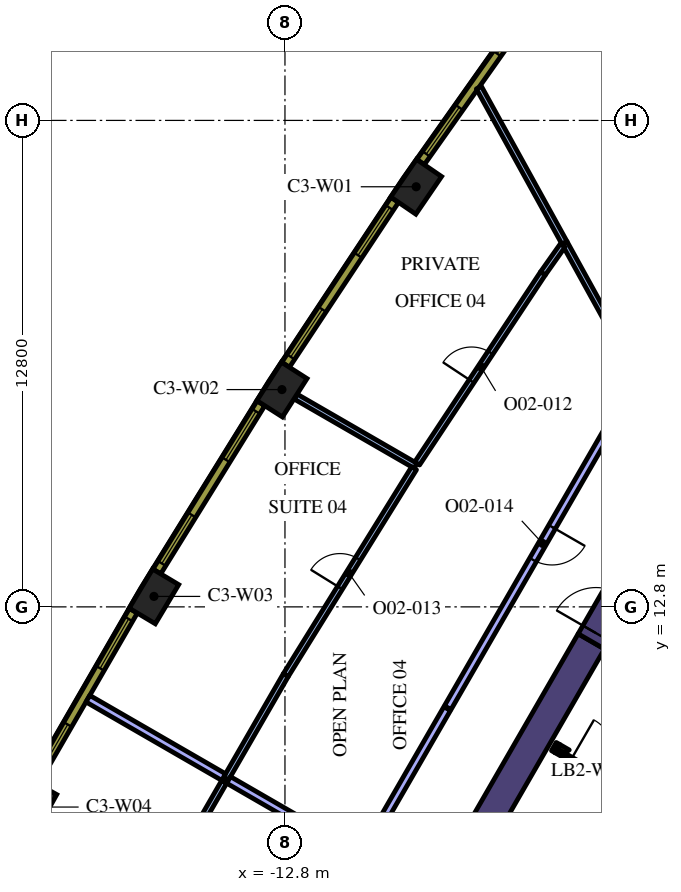
"""IFC4 building model, lengths in metres.
Left out: names, types, materials, properties, quantities, classifications, styles, units other than length and angle.
Written with IfcOpenShell. Run it as: python <this file> out.ifc"""

import sys

from ifc_helpers import new_model, si_unit, direction, frame, frame_2d, origin, origin_2d, place, context, subcontext, project, spatial, polyline, rectangle, outline, extrude, element, fill, save


model = new_model("IFC4")
c1 = context("Model", 3, precision=1e-05, world=origin(), true_north=direction((0.0, 1.0)))
c2 = subcontext(c1, "Body", "Model", "MODEL_VIEW")
j1 = project(units=[si_unit("LENGTHUNIT", "METRE"), si_unit("PLANEANGLEUNIT", "RADIAN")], contexts=[c1])
p1 = place(None, origin())
s1 = spatial("IfcSite", under=j1, at=p1, CompositionType="ELEMENT")
p2 = place(p1, origin())
s2 = spatial("IfcBuilding", under=s1, at=p2, CompositionType="ELEMENT")
p3 = place(p2, frame((0.0, 0.0, 158.4)))
s3 = spatial("IfcBuildingStorey", under=s2, at=p3, CompositionType="ELEMENT", Elevation=158.4)
for number, where, z_axis, x_axis in (
    (1, (-9.348, 23.854, 0.0), (0.0, 0.0, 1.0), (-0.565, -0.825, 0.0)),
    (2, (-12.88, 18.517, 0.0), (0.0, 0.0, 1.0), (-0.539, -0.842, 0.0)),
    (3, (-16.247, 13.075, 0.0), (0.0, 0.0, 1.0), (-0.513, -0.858, 0.0)),
    (4, (-19.447, 7.533, 0.0), (0.0, 0.0, 1.0), (-0.487, -0.874, 0.0)),
):
    element("IfcColumn", number, at=place(p3, frame(where, z_axis=z_axis, x_axis=x_axis)), inside=s3, PredefinedType="COLUMN", context=c2, shape_type="SweptSolid", body=[
        extrude(rectangle(XDim=1.2, YDim=0.8, at=origin_2d()), origin(), (0.0, 0.0, 1.0), 4.2),
    ])
p4 = place(p3, frame((-12.668, -1.842, 0.0), z_axis=(0.0, 0.0, 1.0), x_axis=(0.500003640647, 0.866023301845, 0.0)))
e5 = element("IfcWall", 5, at=p4, inside=s3, PredefinedType="SOLIDWALL", context=c2, shape_type="SweptSolid", body=[
    extrude(rectangle(XDim=15.858, YDim=0.8, at=frame_2d((7.929, 0.0))), origin(), (0.0, 0.0, 1.0), 4.2),
])
p5 = place(p3, frame((-8.06, -1.311, 0.0), z_axis=(0.0, 0.0, 1.0), x_axis=(0.50000273126, 0.866023826885, 0.0)))
e6 = element("IfcWall", 6, at=p5, inside=s3, PredefinedType="SOLIDWALL", context=c2, shape_type="SweptSolid", body=[
    extrude(rectangle(XDim=10.33, YDim=0.25, at=frame_2d((5.165, 0.0))), origin(), (0.0, 0.0, 1.0), 4.2),
])
p6 = place(p3, frame((-5.725, 9.125, 0.0), z_axis=(0.0, 0.0, 1.0), x_axis=(0.866185586049, -0.49972245349, 0.0)))
e7 = element("IfcWall", 7, at=p6, inside=s3, PredefinedType="SOLIDWALL", context=c2, shape_type="SweptSolid", body=[
    extrude(rectangle(XDim=0.11, YDim=0.25, at=frame_2d((0.055, 0.0))), origin(), (0.0, 0.0, 1.0), 4.2),
])
p7 = place(p3, origin())
e8 = element("IfcWall", 8, at=p7, inside=s3, PredefinedType="SOLIDWALL", context=c2, shape_type="SweptSolid", body=[
    extrude(outline(polyline([(-5.689, 8.96), (-5.69, 8.961), (-5.565, 9.177), (-5.319, 9.035), (-5.335, 9.026), (-5.351, 9.015), (-5.366, 9.002), (-5.379, 8.988), (-5.392, 8.972), (-5.402, 8.956), (-5.412, 8.939), (-5.629, 9.064), (-5.629, 9.064), (-5.689, 8.96)])), origin(), (0.0, 0.0, 1.0), 4.2),
])
p8 = place(p3, frame((-5.659, 9.012, 0.0), z_axis=(0.0, 0.0, 1.0), x_axis=(0.866009402589, -0.500027713859, 0.0)))
e9 = element("IfcWall", 9, at=p8, inside=s3, PredefinedType="PARTITIONING", context=c2, shape_type="SweptSolid", body=[
    extrude(rectangle(XDim=2.1, YDim=0.12, at=frame_2d((1.05, 0.0))), origin(), (0.0, 0.0, 1.0), 3.15),
])
p9 = place(p8, frame((0.45, 0.0, 0.0)))
e10 = element("IfcOpeningElement", 10, at=p9, cuts=e9, PredefinedType="OPENING", context=c2, shape_type="SweptSolid", body=[
    extrude(rectangle(XDim=1.2, YDim=2.1, at=frame_2d((0.6, 1.05))), frame((0.0, 0.07, 0.0), z_axis=(0.0, -1.0, 0.0), x_axis=(1.0, 0.0, 0.0)), (0.0, 0.0, 1.0), 0.14),
])
p10 = place(p3, frame((-4.739, 11.892, 0.0), z_axis=(0.0, 0.0, 1.0), x_axis=(0.500062241894, 0.865989465428, 0.0)))
e11 = element("IfcWall", 11, at=p10, inside=s3, PredefinedType="SOLIDWALL", context=c2, shape_type="SweptSolid", body=[
    extrude(rectangle(XDim=1.7, YDim=0.8, at=frame_2d((0.85, 0.0))), origin(), (0.0, 0.0, 1.0), 4.2),
])
p11 = place(p10, frame((0.25, 0.0, 0.0)))
e12 = element("IfcOpeningElement", 12, at=p11, cuts=e11, PredefinedType="OPENING", context=c2, shape_type="SweptSolid", body=[
    extrude(rectangle(XDim=1.2, YDim=2.1, at=frame_2d((0.6, 1.05))), frame((0.0, 0.41, 0.0), z_axis=(0.0, -1.0, 0.0), x_axis=(1.0, 0.0, 0.0)), (0.0, 0.0, 1.0), 0.82),
])
p12 = place(p3, frame((-5.442, 22.374, 0.0), z_axis=(0.0, 0.0, 1.0), x_axis=(-0.482987550425, 0.875627218703, 0.0)))
e13 = element("IfcWall", 13, at=p12, inside=s3, PredefinedType="PARTITIONING", context=c2, shape_type="SweptSolid", body=[
    extrude(rectangle(XDim=4.672, YDim=0.15, at=frame_2d((2.336, 0.0))), origin(), (0.0, 0.0, 1.0), 3.15),
])
p13 = place(p3, frame((-3.47, 18.8, 0.0), z_axis=(0.0, 0.0, 1.0), x_axis=(-0.482974768035, 0.875634269225, 0.0)))
e14 = element("IfcWall", 14, at=p13, inside=s3, PredefinedType="PARTITIONING", context=c2, shape_type="SweptSolid", body=[
    extrude(rectangle(XDim=4.09, YDim=0.15, at=frame_2d((2.045, 0.0))), origin(), (0.0, 0.0, 1.0), 3.15),
])
p14 = place(p3, frame((-9.363, 16.511, 0.0), z_axis=(0.0, 0.0, 1.0), x_axis=(-0.866006134298, 0.500033374244, 0.0)))
e15 = element("IfcWall", 15, at=p14, inside=s3, PredefinedType="PARTITIONING", context=c2, shape_type="SweptSolid", body=[
    extrude(rectangle(XDim=3.648, YDim=0.15, at=frame_2d((1.824, 0.0))), origin(), (0.0, 0.0, 1.0), 3.15),
])
p15 = place(p3, frame((-5.492, 22.31, 0.0), z_axis=(0.0, 0.0, 1.0), x_axis=(-0.576980663571, -0.816757806124, 0.0)))
e16 = element("IfcWall", 16, at=p15, inside=s3, PredefinedType="PARTITIONING", context=c2, shape_type="SweptSolid", body=[
    extrude(rectangle(XDim=0.902, YDim=0.15, at=frame_2d((0.451, 0.0))), origin(), (0.0, 0.0, 1.0), 3.15),
])
p16 = place(p3, frame((-9.322, 16.573, 0.0), z_axis=(0.0, 0.0, 1.0), x_axis=(0.551906048292, 0.833906298009, 0.0)))
e17 = element("IfcWall", 17, at=p16, inside=s3, PredefinedType="PARTITIONING", context=c2, shape_type="SweptSolid", body=[
    extrude(rectangle(XDim=5.995, YDim=0.15, at=frame_2d((2.998, 0.0))), origin(), (0.0, 0.0, 1.0), 3.15),
])
p17 = place(p16, frame((2.595, 0.0, 0.0)))
e18 = element("IfcOpeningElement", 18, at=p17, cuts=e17, PredefinedType="OPENING", context=c2, shape_type="SweptSolid", body=[
    extrude(rectangle(XDim=0.9, YDim=2.1, at=frame_2d((0.45, 1.05))), frame((0.0, 0.085, 0.0), z_axis=(0.0, -1.0, 0.0), x_axis=(1.0, 0.0, 0.0)), (0.0, 0.0, 1.0), 0.17),
])
p18 = place(p3, frame((-12.779, 11.002, 0.0), z_axis=(0.0, 0.0, 1.0), x_axis=(0.527026092571, 0.849849102929, 0.0)))
e19 = element("IfcWall", 19, at=p18, inside=s3, PredefinedType="PARTITIONING", context=c2, shape_type="SweptSolid", body=[
    extrude(rectangle(XDim=6.407, YDim=0.15, at=frame_2d((3.204, 0.0))), origin(), (0.0, 0.0, 1.0), 3.15),
])
p19 = place(p18, frame((2.707, 0.0, 0.0)))
e20 = element("IfcOpeningElement", 20, at=p19, cuts=e19, PredefinedType="OPENING", context=c2, shape_type="SweptSolid", body=[
    extrude(rectangle(XDim=0.9, YDim=2.1, at=frame_2d((0.45, 1.05))), frame((0.0, 0.085, 0.0), z_axis=(0.0, -1.0, 0.0), x_axis=(1.0, 0.0, 0.0)), (0.0, 0.0, 1.0), 0.17),
])
p20 = place(p3, frame((-12.779, 11.002, 0.0), z_axis=(0.0, 0.0, 1.0), x_axis=(-0.499996312652, -0.866027532665, 0.0)))
e21 = element("IfcWall", 21, at=p20, inside=s3, PredefinedType="PARTITIONING", context=c2, shape_type="SweptSolid", body=[
    extrude(rectangle(XDim=3.138, YDim=0.15, at=frame_2d((1.569, 0.0))), origin(), (0.0, 0.0, 1.0), 3.15),
])
p21 = place(p3, frame((-14.413, 8.322, 0.0), z_axis=(0.0, 0.0, 1.0), x_axis=(-0.866034795751, 0.499983732284, 0.0)))
e22 = element("IfcWall", 22, at=p21, inside=s3, PredefinedType="PARTITIONING", context=c2, shape_type="SweptSolid", body=[
    extrude(rectangle(XDim=4.125, YDim=0.2, at=frame_2d((2.062, 0.0))), origin(), (0.0, 0.0, 1.0), 3.15),
])
p22 = place(p3, frame((-10.782, 6.225, 0.0), z_axis=(0.0, 0.0, 1.0), x_axis=(-0.866034752867, 0.499983806564, 0.0)))
e23 = element("IfcWall", 23, at=p22, inside=s3, PredefinedType="PARTITIONING", context=c2, shape_type="SweptSolid", body=[
    extrude(rectangle(XDim=4.043, YDim=0.2, at=frame_2d((2.021, 0.0))), origin(), (0.0, 0.0, 1.0), 3.15),
])
p23 = place(p3, frame((-8.532, 10.122, 0.0), z_axis=(0.0, 0.0, 1.0), x_axis=(-0.499988222896, -0.866032203192, 0.0)))
e24 = element("IfcWall", 24, at=p23, inside=s3, PredefinedType="PARTITIONING", context=c2, shape_type="SweptSolid", body=[
    extrude(rectangle(XDim=4.4, YDim=0.2, at=frame_2d((2.2, 0.0))), origin(), (0.0, 0.0, 1.0), 3.15),
])
p24 = place(p3, frame((-3.522, 18.8, 0.0), z_axis=(0.0, 0.0, 1.0), x_axis=(-0.500015783377, -0.866016291056, 0.0)))
e25 = element("IfcWall", 25, at=p24, inside=s3, PredefinedType="PARTITIONING", context=c2, shape_type="SweptSolid", body=[
    extrude(rectangle(XDim=9.99, YDim=0.2, at=frame_2d((4.995, 0.0))), origin(), (0.0, 0.0, 1.0), 3.15),
])
p25 = place(p24, frame((4.5, 0.0, 0.0)))
e26 = element("IfcOpeningElement", 26, at=p25, cuts=e25, PredefinedType="OPENING", context=c2, shape_type="SweptSolid", body=[
    extrude(rectangle(XDim=1.0, YDim=2.1, at=frame_2d((0.5, 1.05))), frame((0.0, 0.11, 0.0), z_axis=(0.0, -1.0, 0.0), x_axis=(1.0, 0.0, 0.0)), (0.0, 0.0, 1.0), 0.22),
])
p26 = place(p3, frame((-14.398, 8.198, 0.0), z_axis=(0.0, 0.0, 1.0), x_axis=(-0.499993740961, -0.866029017412, 0.0)))
e27 = element("IfcWall", 27, at=p26, inside=s3, PredefinedType="PARTITIONING", context=c2, shape_type="SweptSolid", body=[
    extrude(rectangle(XDim=3.038, YDim=0.15, at=frame_2d((1.519, 0.0))), origin(), (0.0, 0.0, 1.0), 3.15),
])
p27 = place(p3, frame((-6.223, 28.762, 0.0), z_axis=(0.0, 0.0, 1.0), x_axis=(-0.577115207679, -0.816662743772, 0.0)))
e28 = element("IfcWall", 28, at=p27, inside=s3, PredefinedType="SOLIDWALL", context=c2, shape_type="SweptSolid", body=[
    extrude(rectangle(XDim=5.213, YDim=0.24, at=frame_2d((2.606, 0.0))), origin(), (0.0, 0.0, 1.0), 3.95),
])
p28 = place(p27, frame((0.221, 0.0, 0.9)))
e29 = element("IfcOpeningElement", 29, at=p28, cuts=e28, PredefinedType="OPENING", context=c2, shape_type="SweptSolid", body=[
    extrude(rectangle(XDim=1.5, YDim=2.55, at=frame_2d((0.75, 1.275))), frame((0.0, 0.13, 0.0), z_axis=(0.0, -1.0, 0.0), x_axis=(1.0, 0.0, 0.0)), (0.0, 0.0, 1.0), 0.26),
])
p29 = place(p27, frame((3.452, 0.0, 0.9)))
e30 = element("IfcOpeningElement", 30, at=p29, cuts=e28, PredefinedType="OPENING", context=c2, shape_type="SweptSolid", body=[
    extrude(rectangle(XDim=1.5, YDim=2.55, at=frame_2d((0.75, 1.275))), frame((0.0, 0.13, 0.0), z_axis=(0.0, -1.0, 0.0), x_axis=(1.0, 0.0, 0.0)), (0.0, 0.0, 1.0), 0.26),
])
p30 = place(p3, frame((-9.911, 23.51, 0.0), z_axis=(0.0, 0.0, 1.0), x_axis=(-0.551892811511, -0.833915058386, 0.0)))
e31 = element("IfcWall", 31, at=p30, inside=s3, PredefinedType="SOLIDWALL", context=c2, shape_type="SweptSolid", body=[
    extrude(rectangle(XDim=5.204, YDim=0.24, at=frame_2d((2.602, 0.0))), origin(), (0.0, 0.0, 1.0), 3.95),
])
p31 = place(p30, frame((0.248, 0.0, 0.9)))
e32 = element("IfcOpeningElement", 32, at=p31, cuts=e31, PredefinedType="OPENING", context=c2, shape_type="SweptSolid", body=[
    extrude(rectangle(XDim=1.5, YDim=2.55, at=frame_2d((0.75, 1.275))), frame((0.0, 0.13, 0.0), z_axis=(0.0, -1.0, 0.0), x_axis=(1.0, 0.0, 0.0)), (0.0, 0.0, 1.0), 0.26),
])
p32 = place(p30, frame((3.455, 0.0, 0.9)))
e33 = element("IfcOpeningElement", 33, at=p32, cuts=e31, PredefinedType="OPENING", context=c2, shape_type="SweptSolid", body=[
    extrude(rectangle(XDim=1.5, YDim=2.55, at=frame_2d((0.75, 1.275))), frame((0.0, 0.13, 0.0), z_axis=(0.0, -1.0, 0.0), x_axis=(1.0, 0.0, 0.0)), (0.0, 0.0, 1.0), 0.26),
])
p33 = place(p3, frame((-13.433, 18.156, 0.0), z_axis=(0.0, 0.0, 1.0), x_axis=(-0.526197926587, -0.850362124072, 0.0)))
e34 = element("IfcWall", 34, at=p33, inside=s3, PredefinedType="SOLIDWALL", context=c2, shape_type="SweptSolid", body=[
    extrude(rectangle(XDim=5.203, YDim=0.24, at=frame_2d((2.602, 0.0))), origin(), (0.0, 0.0, 1.0), 3.95),
])
p34 = place(p33, frame((0.248, 0.0, 0.9)))
e35 = element("IfcOpeningElement", 35, at=p34, cuts=e34, PredefinedType="OPENING", context=c2, shape_type="SweptSolid", body=[
    extrude(rectangle(XDim=1.5, YDim=2.55, at=frame_2d((0.75, 1.275))), frame((0.0, 0.13, 0.0), z_axis=(0.0, -1.0, 0.0), x_axis=(1.0, 0.0, 0.0)), (0.0, 0.0, 1.0), 0.26),
])
p35 = place(p33, frame((3.455, 0.0, 0.9)))
e36 = element("IfcOpeningElement", 36, at=p35, cuts=e34, PredefinedType="OPENING", context=c2, shape_type="SweptSolid", body=[
    extrude(rectangle(XDim=1.5, YDim=2.55, at=frame_2d((0.75, 1.275))), frame((0.0, 0.13, 0.0), z_axis=(0.0, -1.0, 0.0), x_axis=(1.0, 0.0, 0.0)), (0.0, 0.0, 1.0), 0.26),
])
p36 = place(p3, frame((-16.789, 12.697, 0.0), z_axis=(0.0, 0.0, 1.0), x_axis=(-0.500009456303, -0.866019944116, 0.0)))
e37 = element("IfcWall", 37, at=p36, inside=s3, PredefinedType="SOLIDWALL", context=c2, shape_type="SweptSolid", body=[
    extrude(rectangle(XDim=5.204, YDim=0.24, at=frame_2d((2.602, 0.0))), origin(), (0.0, 0.0, 1.0), 3.95),
])
p37 = place(p36, frame((0.248, 0.0, 0.9)))
e38 = element("IfcOpeningElement", 38, at=p37, cuts=e37, PredefinedType="OPENING", context=c2, shape_type="SweptSolid", body=[
    extrude(rectangle(XDim=1.5, YDim=2.55, at=frame_2d((0.75, 1.275))), frame((0.0, 0.13, 0.0), z_axis=(0.0, -1.0, 0.0), x_axis=(1.0, 0.0, 0.0)), (0.0, 0.0, 1.0), 0.26),
])
p38 = place(p36, frame((3.455, 0.0, 0.9)))
e39 = element("IfcOpeningElement", 39, at=p38, cuts=e37, PredefinedType="OPENING", context=c2, shape_type="SweptSolid", body=[
    extrude(rectangle(XDim=1.5, YDim=2.55, at=frame_2d((0.75, 1.275))), frame((0.0, 0.13, 0.0), z_axis=(0.0, -1.0, 0.0), x_axis=(1.0, 0.0, 0.0)), (0.0, 0.0, 1.0), 0.26),
])
p39 = place(p9, origin())
e40 = element("IfcDoor", 40, at=p39, inside=s3, OperationType="SINGLE_SWING_LEFT", PredefinedType="DOOR", context=c2, shape_type="SweptSolid", body=[
    extrude(rectangle(XDim=1.2, YDim=2.1, at=frame_2d((0.6, 1.05))), frame((0.0, 0.025, 0.0), z_axis=(0.0, -1.0, 0.0), x_axis=(1.0, 0.0, 0.0)), (0.0, 0.0, 1.0), 0.05),
])
fill(e10, e40)
p40 = place(p11, origin())
e41 = element("IfcDoor", 41, at=p40, inside=s3, OperationType="SINGLE_SWING_LEFT", PredefinedType="DOOR", context=c2, shape_type="SweptSolid", body=[
    extrude(rectangle(XDim=1.2, YDim=2.1, at=frame_2d((0.6, 1.05))), frame((0.0, 0.025, 0.0), z_axis=(0.0, -1.0, 0.0), x_axis=(1.0, 0.0, 0.0)), (0.0, 0.0, 1.0), 0.05),
])
fill(e12, e41)
p41 = place(p17, origin())
e42 = element("IfcDoor", 42, at=p41, inside=s3, OperationType="SINGLE_SWING_RIGHT", PredefinedType="DOOR", context=c2, shape_type="SweptSolid", body=[
    extrude(rectangle(XDim=0.9, YDim=2.1, at=frame_2d((0.45, 1.05))), frame((0.0, 0.025, 0.0), z_axis=(0.0, -1.0, 0.0), x_axis=(1.0, 0.0, 0.0)), (0.0, 0.0, 1.0), 0.05),
])
fill(e18, e42)
p42 = place(p19, origin())
e43 = element("IfcDoor", 43, at=p42, inside=s3, OperationType="SINGLE_SWING_LEFT", PredefinedType="DOOR", context=c2, shape_type="SweptSolid", body=[
    extrude(rectangle(XDim=0.9, YDim=2.1, at=frame_2d((0.45, 1.05))), frame((0.0, 0.025, 0.0), z_axis=(0.0, -1.0, 0.0), x_axis=(1.0, 0.0, 0.0)), (0.0, 0.0, 1.0), 0.05),
])
fill(e20, e43)
p43 = place(p25, origin())
e44 = element("IfcDoor", 44, at=p43, inside=s3, OperationType="SINGLE_SWING_RIGHT", PredefinedType="DOOR", context=c2, shape_type="SweptSolid", body=[
    extrude(rectangle(XDim=1.0, YDim=2.1, at=frame_2d((0.5, 1.05))), frame((0.0, 0.025, 0.0), z_axis=(0.0, -1.0, 0.0), x_axis=(1.0, 0.0, 0.0)), (0.0, 0.0, 1.0), 0.05),
])
fill(e26, e44)
p44 = place(p28, origin())
e45 = element("IfcWindow", 45, at=p44, inside=s3, PartitioningType="SINGLE_PANEL", PredefinedType="WINDOW", context=c2, shape_type="SweptSolid", body=[
    extrude(rectangle(XDim=1.5, YDim=2.55, at=frame_2d((0.75, 1.275))), frame((0.0, 0.04, 0.0), z_axis=(0.0, -1.0, 0.0), x_axis=(1.0, 0.0, 0.0)), (0.0, 0.0, 1.0), 0.06),
])
fill(e29, e45)
p45 = place(p29, origin())
e46 = element("IfcWindow", 46, at=p45, inside=s3, PartitioningType="SINGLE_PANEL", PredefinedType="WINDOW", context=c2, shape_type="SweptSolid", body=[
    extrude(rectangle(XDim=1.5, YDim=2.55, at=frame_2d((0.75, 1.275))), frame((0.0, 0.04, 0.0), z_axis=(0.0, -1.0, 0.0), x_axis=(1.0, 0.0, 0.0)), (0.0, 0.0, 1.0), 0.06),
])
fill(e30, e46)
p46 = place(p31, origin())
e47 = element("IfcWindow", 47, at=p46, inside=s3, PartitioningType="SINGLE_PANEL", PredefinedType="WINDOW", context=c2, shape_type="SweptSolid", body=[
    extrude(rectangle(XDim=1.5, YDim=2.55, at=frame_2d((0.75, 1.275))), frame((0.0, 0.04, 0.0), z_axis=(0.0, -1.0, 0.0), x_axis=(1.0, 0.0, 0.0)), (0.0, 0.0, 1.0), 0.06),
])
fill(e32, e47)
p47 = place(p32, origin())
e48 = element("IfcWindow", 48, at=p47, inside=s3, PartitioningType="SINGLE_PANEL", PredefinedType="WINDOW", context=c2, shape_type="SweptSolid", body=[
    extrude(rectangle(XDim=1.5, YDim=2.55, at=frame_2d((0.75, 1.275))), frame((0.0, 0.04, 0.0), z_axis=(0.0, -1.0, 0.0), x_axis=(1.0, 0.0, 0.0)), (0.0, 0.0, 1.0), 0.06),
])
fill(e33, e48)
p48 = place(p34, origin())
e49 = element("IfcWindow", 49, at=p48, inside=s3, PartitioningType="SINGLE_PANEL", PredefinedType="WINDOW", context=c2, shape_type="SweptSolid", body=[
    extrude(rectangle(XDim=1.5, YDim=2.55, at=frame_2d((0.75, 1.275))), frame((0.0, 0.04, 0.0), z_axis=(0.0, -1.0, 0.0), x_axis=(1.0, 0.0, 0.0)), (0.0, 0.0, 1.0), 0.06),
])
fill(e35, e49)
p49 = place(p35, origin())
e50 = element("IfcWindow", 50, at=p49, inside=s3, PartitioningType="SINGLE_PANEL", PredefinedType="WINDOW", context=c2, shape_type="SweptSolid", body=[
    extrude(rectangle(XDim=1.5, YDim=2.55, at=frame_2d((0.75, 1.275))), frame((0.0, 0.04, 0.0), z_axis=(0.0, -1.0, 0.0), x_axis=(1.0, 0.0, 0.0)), (0.0, 0.0, 1.0), 0.06),
])
fill(e36, e50)
p50 = place(p37, origin())
e51 = element("IfcWindow", 51, at=p50, inside=s3, PartitioningType="SINGLE_PANEL", PredefinedType="WINDOW", context=c2, shape_type="SweptSolid", body=[
    extrude(rectangle(XDim=1.5, YDim=2.55, at=frame_2d((0.75, 1.275))), frame((0.0, 0.04, 0.0), z_axis=(0.0, -1.0, 0.0), x_axis=(1.0, 0.0, 0.0)), (0.0, 0.0, 1.0), 0.06),
])
fill(e38, e51)
p51 = place(p38, origin())
e52 = element("IfcWindow", 52, at=p51, inside=s3, PartitioningType="SINGLE_PANEL", PredefinedType="WINDOW", context=c2, shape_type="SweptSolid", body=[
    extrude(rectangle(XDim=1.5, YDim=2.55, at=frame_2d((0.75, 1.275))), frame((0.0, 0.04, 0.0), z_axis=(0.0, -1.0, 0.0), x_axis=(1.0, 0.0, 0.0)), (0.0, 0.0, 1.0), 0.06),
])
fill(e39, e52)
save(model, sys.argv[1])
